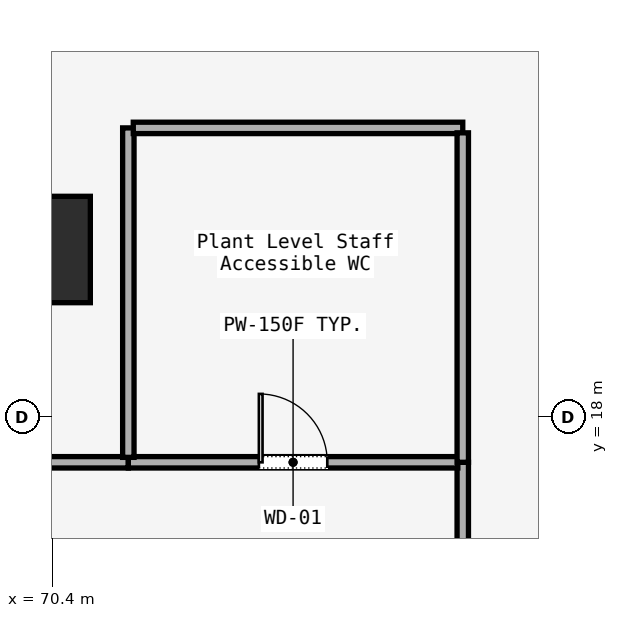
"""IFC4 building model, lengths in metres.
Left out: names, types, materials, properties, quantities, classifications, styles, units other than length and angle.
Written with IfcOpenShell. Run it as: python <this file> out.ifc"""

import sys

from ifc_helpers import new_model, si_unit, direction, frame, frame_2d, origin, origin_2d, place, context, subcontext, project, spatial, rectangle, extrude, element, fill, save


model = new_model("IFC4")
c1 = context("Model", 3, precision=1e-05, world=origin(), true_north=direction((0.0, 1.0)))
c2 = subcontext(c1, "Body", "Model", "MODEL_VIEW")
j1 = project(units=[si_unit("LENGTHUNIT", "METRE"), si_unit("PLANEANGLEUNIT", "RADIAN")], contexts=[c1])
p1 = place(None, origin())
s1 = spatial("IfcSite", under=j1, at=p1, CompositionType="ELEMENT")
p2 = place(p1, origin())
s2 = spatial("IfcBuilding", under=s1, at=p2, CompositionType="ELEMENT")
p3 = place(p2, frame((0.0, 0.0, 24.0)))
s3 = spatial("IfcBuildingStorey", under=s2, at=p3, CompositionType="ELEMENT", Elevation=24.0)
p4 = place(p3, frame((70.2, 20.2, 0.0), z_axis=(0.0, 0.0, 1.0), x_axis=(1.0, 0.0, 0.0)))
e1 = element("IfcColumn", 1, at=p4, inside=s3, PredefinedType="COLUMN", context=c2, shape_type="SweptSolid", body=[
    extrude(rectangle(XDim=1.4, YDim=1.4, at=origin_2d()), origin(), (0.0, 0.0, 1.0), 5.55),
])
p5 = place(p3, frame((75.8, 17.4, 0.0), z_axis=(0.0, 0.0, 1.0), x_axis=(0.0, -1.0, 0.0)))
e2 = element("IfcWall", 2, at=p5, inside=s3, PredefinedType="PARTITIONING", context=c2, shape_type="SweptSolid", body=[
    extrude(rectangle(XDim=2.25, YDim=0.15, at=frame_2d((1.125, 0.0))), origin(), (0.0, 0.0, 1.0), 4.17),
])
p6 = place(p3, frame((68.8, 17.4, 0.0), z_axis=(0.0, 0.0, 1.0), x_axis=(1.0, 0.0, 0.0)))
e3 = element("IfcWall", 3, at=p6, inside=s3, PredefinedType="PARTITIONING", context=c2, shape_type="SweptSolid", body=[
    extrude(rectangle(XDim=2.6, YDim=0.15, at=frame_2d((1.3, 0.0))), origin(), (0.0, 0.0, 1.0), 4.17),
])
p7 = place(p3, frame((71.4, 17.4, 0.0), z_axis=(0.0, 0.0, 1.0), x_axis=(1.0, 0.0, 0.0)))
e4 = element("IfcWall", 4, at=p7, inside=s3, PredefinedType="PARTITIONING", context=c2, shape_type="SweptSolid", body=[
    extrude(rectangle(XDim=4.335, YDim=0.15, at=frame_2d((2.167, 0.0))), origin(), (0.0, 0.0, 1.0), 4.17),
])
p8 = place(p7, frame((1.718, 0.0, 0.0)))
e5 = element("IfcOpeningElement", 5, at=p8, cuts=e4, PredefinedType="OPENING", context=c2, shape_type="SweptSolid", body=[
    extrude(rectangle(XDim=0.9, YDim=2.15, at=frame_2d((0.45, 1.075))), frame((0.0, 0.075, 0.0), z_axis=(0.0, -1.0, 0.0), x_axis=(1.0, 0.0, 0.0)), (0.0, 0.0, 1.0), 0.15),
])
for number, where, z_axis, x_axis in (
    (6, (71.4, 17.465, 0.0), (0.0, 0.0, 1.0), (0.0, 1.0, 0.0)),
    (7, (71.465, 21.8, 0.0), (0.0, 0.0, 1.0), (1.0, 0.0, 0.0)),
):
    element("IfcWall", number, at=place(p3, frame(where, z_axis=z_axis, x_axis=x_axis)), inside=s3, PredefinedType="PARTITIONING", context=c2, shape_type="SweptSolid", body=[
        extrude(rectangle(XDim=4.335, YDim=0.15, at=frame_2d((2.167, 0.0))), origin(), (0.0, 0.0, 1.0), 4.17),
    ])
p9 = place(p3, frame((75.8, 21.735, 0.0), z_axis=(0.0, 0.0, 1.0), x_axis=(0.0, -1.0, 0.0)))
e8 = element("IfcWall", 8, at=p9, inside=s3, PredefinedType="PARTITIONING", context=c2, shape_type="SweptSolid", body=[
    extrude(rectangle(XDim=4.335, YDim=0.15, at=frame_2d((2.167, 0.0))), origin(), (0.0, 0.0, 1.0), 4.17),
])
p10 = place(p8, origin())
e9 = element("IfcDoor", 9, at=p10, inside=s3, OperationType="SINGLE_SWING_RIGHT", PredefinedType="DOOR", context=c2, shape_type="SweptSolid", body=[
    extrude(rectangle(XDim=0.9, YDim=2.15, at=frame_2d((0.45, 1.075))), frame((0.0, 0.025, 0.0), z_axis=(0.0, -1.0, 0.0), x_axis=(1.0, 0.0, 0.0)), (0.0, 0.0, 1.0), 0.05),
])
fill(e5, e9)
save(model, sys.argv[1])
